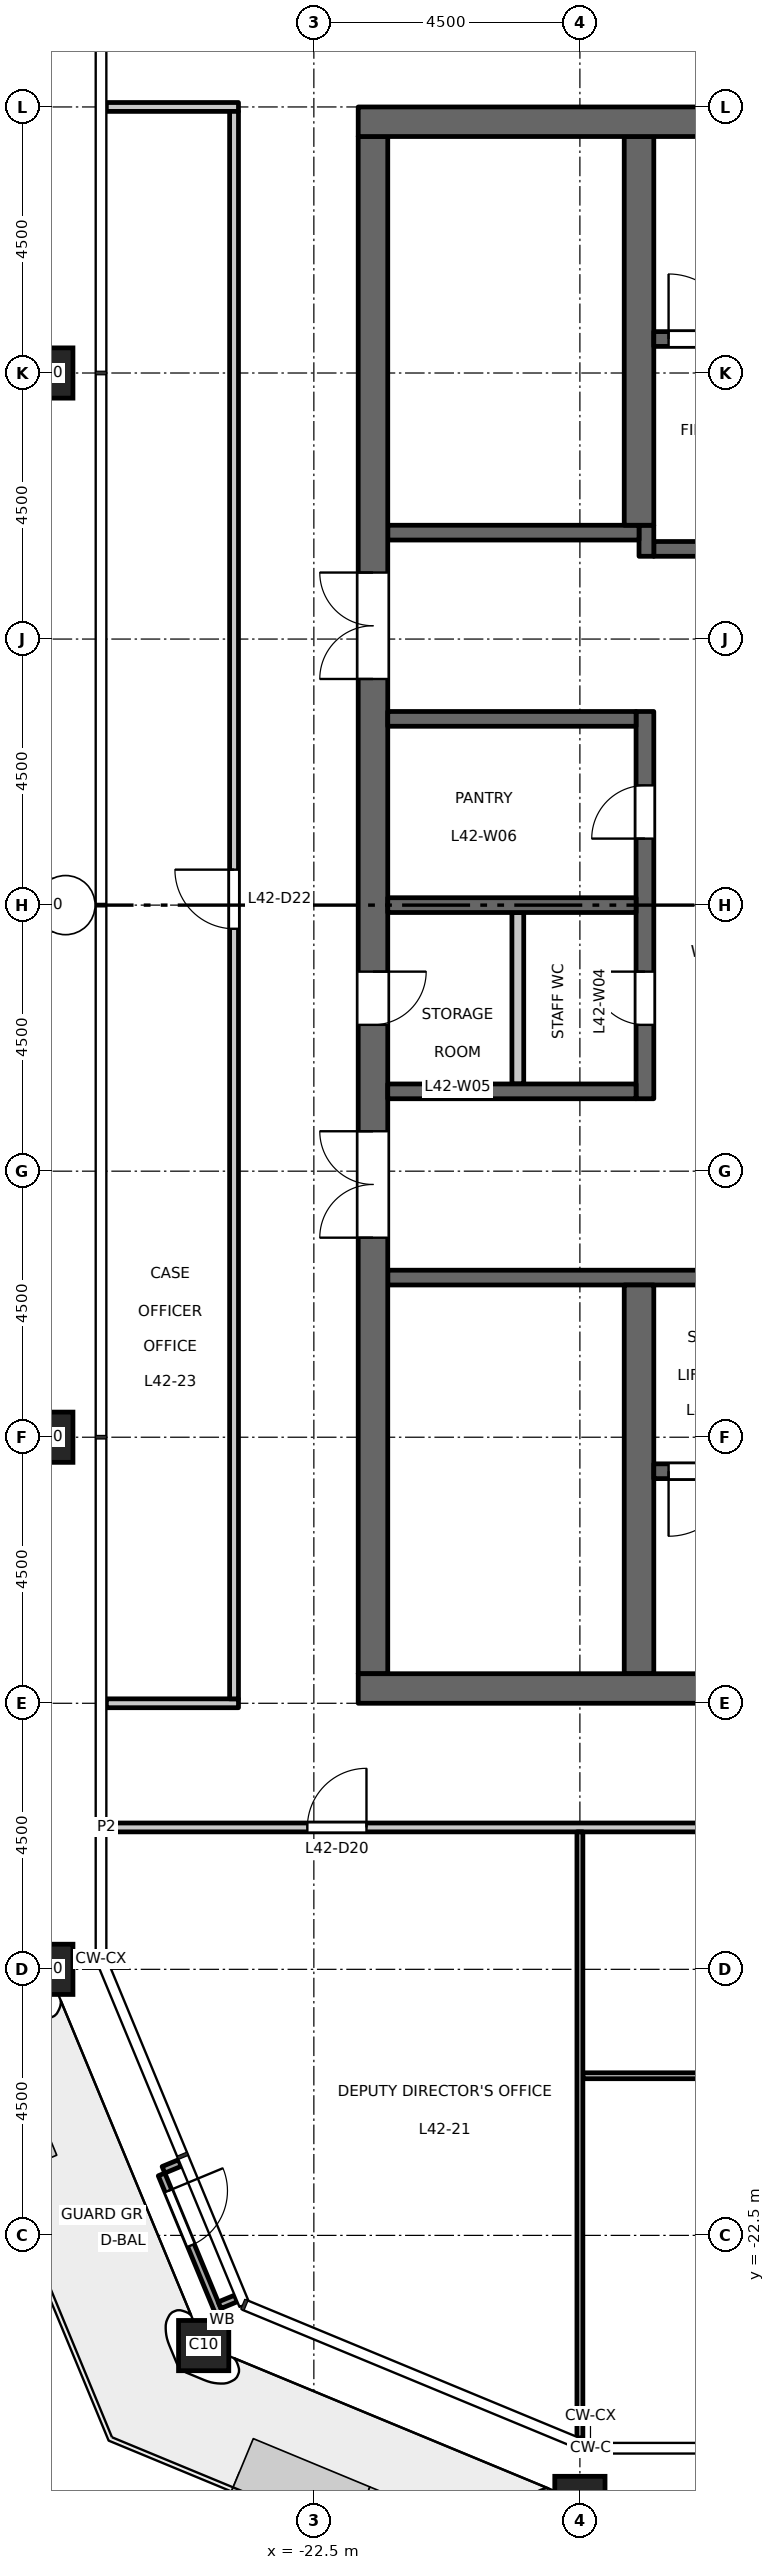
"""IFC4 building model, lengths in metres.
Left out: names, types, materials, properties, quantities, classifications, styles, units other than length and angle.
Written with IfcOpenShell. Run it as: python <this file> out.ifc"""

import sys

from ifc_helpers import new_model, si_unit, direction, frame, frame_2d, origin, origin_2d, place, context, subcontext, project, spatial, rectangle, hollow_rectangle, extrude, element, fill, save


model = new_model("IFC4")
c1 = context("Model", 3, precision=1e-05, world=origin(), true_north=direction((0.0, 1.0)))
c2 = subcontext(c1, "Body", "Model", "MODEL_VIEW")
j1 = project(units=[si_unit("LENGTHUNIT", "METRE"), si_unit("PLANEANGLEUNIT", "RADIAN")], contexts=[c1])
p1 = place(None, origin())
s1 = spatial("IfcSite", under=j1, at=p1, CompositionType="ELEMENT")
p2 = place(p1, origin())
s2 = spatial("IfcBuilding", under=s1, at=p2, CompositionType="ELEMENT")
p3 = place(p2, frame((0.0, 0.0, 197.2)))
s3 = spatial("IfcBuildingStorey", under=s2, at=p3, CompositionType="ELEMENT", Elevation=197.2)
for number, where, z_axis, x_axis in (
    (1, (-18.0, -27.0, 0.0), (0.0, 0.0, 1.0), (1.0, 0.0, 0.0)),
    (2, (-27.0, 9.0, 0.0), (0.0, 0.0, 1.0), (1.0, 0.0, 0.0)),
    (3, (-27.0, 0.0, 0.0), (0.0, 0.0, 1.0), (1.0, 0.0, 0.0)),
    (4, (-27.0, -9.0, 0.0), (0.0, 0.0, 1.0), (1.0, 0.0, 0.0)),
    (5, (-27.0, -18.0, 0.0), (0.0, 0.0, 1.0), (1.0, 0.0, 0.0)),
    (6, (-24.364, -24.364, 0.0), (0.0, 0.0, 1.0), (1.0, 0.0, 0.0)),
):
    element("IfcColumn", number, at=place(p3, frame(where, z_axis=z_axis, x_axis=x_axis)), inside=s3, PredefinedType="COLUMN", context=c2, shape_type="SweptSolid", body=[
        extrude(hollow_rectangle(XDim=0.85, YDim=0.85, WallThickness=0.05, at=origin_2d()), origin(), (0.0, 0.0, 1.0), 4.5),
    ])
p4 = place(p3, frame((-12.15, 6.025, 0.0), z_axis=(0.0, 0.0, 1.0), x_axis=(-1.0, 0.0, 0.0)))
e7 = element("IfcWall", 7, at=p4, inside=s3, PredefinedType="SHEAR", context=c2, shape_type="SweptSolid", body=[
    extrude(rectangle(XDim=4.6, YDim=0.25, at=frame_2d((2.3, 0.0))), origin(), (0.0, 0.0, 1.0), 4.35),
])
p5 = place(p4, frame((1.8, 0.0, 0.0)))
e8 = element("IfcOpeningElement", 8, at=p5, cuts=e7, PredefinedType="OPENING", context=c2, shape_type="SweptSolid", body=[
    extrude(rectangle(XDim=1.0, YDim=2.1, at=frame_2d((0.5, 1.05))), frame((0.0, 0.135, 0.0), z_axis=(0.0, -1.0, 0.0), x_axis=(1.0, 0.0, 0.0)), (0.0, 0.0, 1.0), 0.27),
])
p6 = place(p3, frame((-16.875, 5.9, 0.0), z_axis=(0.0, 0.0, 1.0), x_axis=(0.0, 1.0, 0.0)))
e9 = element("IfcWall", 9, at=p6, inside=s3, PredefinedType="SHEAR", context=c2, shape_type="SweptSolid", body=[
    extrude(rectangle(XDim=0.525, YDim=0.25, at=frame_2d((0.263, 0.0))), origin(), (0.0, 0.0, 1.0), 4.35),
])
p7 = place(p3, frame((-17.0, 6.3, 0.0), z_axis=(0.0, 0.0, 1.0), x_axis=(-1.0, 0.0, 0.0)))
e10 = element("IfcWall", 10, at=p7, inside=s3, PredefinedType="SHEAR", context=c2, shape_type="SweptSolid", body=[
    extrude(rectangle(XDim=4.25, YDim=0.25, at=frame_2d((2.125, 0.0))), origin(), (0.0, 0.0, 1.0), 4.35),
])
p8 = place(p3, frame((-12.15, -6.3, 0.0), z_axis=(0.0, 0.0, 1.0), x_axis=(-1.0, 0.0, 0.0)))
e11 = element("IfcWall", 11, at=p8, inside=s3, PredefinedType="SHEAR", context=c2, shape_type="SweptSolid", body=[
    extrude(rectangle(XDim=9.1, YDim=0.25, at=frame_2d((4.55, 0.0))), origin(), (0.0, 0.0, 1.0), 4.35),
])
p9 = place(p8, frame((1.8, 0.0, 0.0)))
e12 = element("IfcOpeningElement", 12, at=p9, cuts=e11, PredefinedType="OPENING", context=c2, shape_type="SweptSolid", body=[
    extrude(rectangle(XDim=1.0, YDim=2.1, at=frame_2d((0.5, 1.05))), frame((0.0, 0.135, 0.0), z_axis=(0.0, -1.0, 0.0), x_axis=(1.0, 0.0, 0.0)), (0.0, 0.0, 1.0), 0.27),
])
p10 = place(p3, frame((-21.5, -13.0, 0.0), z_axis=(0.0, 0.0, 1.0), x_axis=(0.0, 1.0, 0.0)))
e13 = element("IfcWall", 13, at=p10, inside=s3, PredefinedType="SHEAR", context=c2, shape_type="SweptSolid", body=[
    extrude(rectangle(XDim=26.0, YDim=0.5, at=frame_2d((13.0, 0.0))), origin(), (0.0, 0.0, 1.0), 4.35),
])
p11 = place(p10, frame((16.825, 0.0, 0.0)))
e14 = element("IfcOpeningElement", 14, at=p11, cuts=e13, PredefinedType="OPENING", context=c2, shape_type="SweptSolid", body=[
    extrude(rectangle(XDim=1.8, YDim=2.1, at=frame_2d((0.9, 1.05))), frame((0.0, 0.26, 0.0), z_axis=(0.0, -1.0, 0.0), x_axis=(1.0, 0.0, 0.0)), (0.0, 0.0, 1.0), 0.52),
])
p12 = place(p10, frame((7.375, 0.0, 0.0)))
e15 = element("IfcOpeningElement", 15, at=p12, cuts=e13, PredefinedType="OPENING", context=c2, shape_type="SweptSolid", body=[
    extrude(rectangle(XDim=1.8, YDim=2.1, at=frame_2d((0.9, 1.05))), frame((0.0, 0.26, 0.0), z_axis=(0.0, -1.0, 0.0), x_axis=(1.0, 0.0, 0.0)), (0.0, 0.0, 1.0), 0.52),
])
p13 = place(p10, frame((10.975, 0.0, 0.0)))
e16 = element("IfcOpeningElement", 16, at=p13, cuts=e13, PredefinedType="OPENING", context=c2, shape_type="SweptSolid", body=[
    extrude(rectangle(XDim=0.9, YDim=2.1, at=frame_2d((0.45, 1.05))), frame((0.0, 0.26, 0.0), z_axis=(0.0, -1.0, 0.0), x_axis=(1.0, 0.0, 0.0)), (0.0, 0.0, 1.0), 0.52),
])
p14 = place(p3, frame((-16.9, -3.275, 0.0), z_axis=(0.0, 0.0, 1.0), x_axis=(0.0, 1.0, 0.0)))
e17 = element("IfcWall", 17, at=p14, inside=s3, PredefinedType="SHEAR", context=c2, shape_type="SweptSolid", body=[
    extrude(rectangle(XDim=6.55, YDim=0.3, at=frame_2d((3.275, 0.0))), origin(), (0.0, 0.0, 1.0), 4.35),
])
p15 = place(p14, frame((1.25, 0.0, 0.0)))
e18 = element("IfcOpeningElement", 18, at=p15, cuts=e17, PredefinedType="OPENING", context=c2, shape_type="SweptSolid", body=[
    extrude(rectangle(XDim=0.9, YDim=2.1, at=frame_2d((0.45, 1.05))), frame((0.0, 0.16, 0.0), z_axis=(0.0, -1.0, 0.0), x_axis=(1.0, 0.0, 0.0)), (0.0, 0.0, 1.0), 0.32),
])
p16 = place(p14, frame((4.4, 0.0, 0.0)))
e19 = element("IfcOpeningElement", 19, at=p16, cuts=e17, PredefinedType="OPENING", context=c2, shape_type="SweptSolid", body=[
    extrude(rectangle(XDim=0.9, YDim=2.1, at=frame_2d((0.45, 1.05))), frame((0.0, 0.16, 0.0), z_axis=(0.0, -1.0, 0.0), x_axis=(1.0, 0.0, 0.0)), (0.0, 0.0, 1.0), 0.32),
])
for number, where, z_axis, x_axis in (
    (20, (-17.05, 0.0, 0.0), (0.0, 0.0, 1.0), (-1.0, 0.0, 0.0)),
    (21, (-17.05, 3.15, 0.0), (0.0, 0.0, 1.0), (-1.0, 0.0, 0.0)),
    (22, (-17.05, -3.15, 0.0), (0.0, 0.0, 1.0), (-1.0, 0.0, 0.0)),
):
    element("IfcWall", number, at=place(p3, frame(where, z_axis=z_axis, x_axis=x_axis)), inside=s3, PredefinedType="SHEAR", context=c2, shape_type="SweptSolid", body=[
        extrude(rectangle(XDim=4.2, YDim=0.25, at=frame_2d((2.1, 0.0))), origin(), (0.0, 0.0, 1.0), 4.35),
    ])
p17 = place(p3, frame((-19.05, -3.025, 0.0), z_axis=(0.0, 0.0, 1.0), x_axis=(0.0, 1.0, 0.0)))
e23 = element("IfcWall", 23, at=p17, inside=s3, PredefinedType="PARTITIONING", context=c2, shape_type="SweptSolid", body=[
    extrude(rectangle(XDim=2.9, YDim=0.2, at=frame_2d((1.45, 0.0))), origin(), (0.0, 0.0, 1.0), 4.35),
])
for number, where, z_axis, x_axis in (
    (24, (-17.0, 6.425, 0.0), (0.0, 0.0, 1.0), (0.0, 1.0, 0.0)),
    (25, (-17.0, -13.0, 0.0), (0.0, 0.0, 1.0), (0.0, 1.0, 0.0)),
):
    element("IfcWall", number, at=place(p3, frame(where, z_axis=z_axis, x_axis=x_axis)), inside=s3, PredefinedType="SHEAR", context=c2, shape_type="SweptSolid", body=[
        extrude(rectangle(XDim=6.575, YDim=0.5, at=frame_2d((3.288, 0.0))), origin(), (0.0, 0.0, 1.0), 4.35),
    ])
p18 = place(p3, frame((-8.75, 9.575, 0.0), z_axis=(0.0, 0.0, 1.0), x_axis=(-1.0, 0.0, 0.0)))
e26 = element("IfcWall", 26, at=p18, inside=s3, PredefinedType="SHEAR", context=c2, shape_type="SweptSolid", body=[
    extrude(rectangle(XDim=8.0, YDim=0.25, at=frame_2d((4.0, 0.0))), origin(), (0.0, 0.0, 1.0), 4.35),
])
p19 = place(p18, frame((6.65, 0.0, 0.0)))
e27 = element("IfcOpeningElement", 27, at=p19, cuts=e26, PredefinedType="OPENING", context=c2, shape_type="SweptSolid", body=[
    extrude(rectangle(XDim=1.1, YDim=2.1, at=frame_2d((0.55, 1.05))), frame((0.0, 0.135, 0.0), z_axis=(0.0, -1.0, 0.0), x_axis=(1.0, 0.0, 0.0)), (0.0, 0.0, 1.0), 0.27),
])
p20 = place(p3, frame((-8.75, -9.575, 0.0), z_axis=(0.0, 0.0, 1.0), x_axis=(-1.0, 0.0, 0.0)))
e28 = element("IfcWall", 28, at=p20, inside=s3, PredefinedType="SHEAR", context=c2, shape_type="SweptSolid", body=[
    extrude(rectangle(XDim=8.0, YDim=0.25, at=frame_2d((4.0, 0.0))), origin(), (0.0, 0.0, 1.0), 4.35),
])
p21 = place(p20, frame((6.65, 0.0, 0.0)))
e29 = element("IfcOpeningElement", 29, at=p21, cuts=e28, PredefinedType="OPENING", context=c2, shape_type="SweptSolid", body=[
    extrude(rectangle(XDim=1.1, YDim=2.1, at=frame_2d((0.55, 1.05))), frame((0.0, 0.135, 0.0), z_axis=(0.0, -1.0, 0.0), x_axis=(1.0, 0.0, 0.0)), (0.0, 0.0, 1.0), 0.27),
])
for number, where, z_axis, x_axis in (
    (30, (-8.25, 13.25, 0.0), (0.0, 0.0, 1.0), (-1.0, 0.0, 0.0)),
    (31, (-8.25, -13.25, 0.0), (0.0, 0.0, 1.0), (-1.0, 0.0, 0.0)),
):
    element("IfcWall", number, at=place(p3, frame(where, z_axis=z_axis, x_axis=x_axis)), inside=s3, PredefinedType="SHEAR", context=c2, shape_type="SweptSolid", body=[
        extrude(rectangle(XDim=13.5, YDim=0.5, at=frame_2d((6.75, 0.0))), origin(), (0.0, 0.0, 1.0), 4.35),
    ])
p22 = place(p3, frame((-24.766, -21.276, 0.0), z_axis=(0.0, 0.0, 1.0), x_axis=(-0.923917630863, -0.382591441855, 0.0)))
e32 = element("IfcWall", 32, at=p22, inside=s3, PredefinedType="STANDARD", context=c2, shape_type="SweptSolid", body=[
    extrude(rectangle(XDim=0.3, YDim=0.12, at=frame_2d((0.15, 0.0))), origin(), (0.0, 0.0, 1.0), 4.35),
])
p23 = place(p3, frame((-23.818, -23.566, 0.0), z_axis=(0.0, 0.0, 1.0), x_axis=(-0.923629715641, -0.383285987724, 0.0)))
e33 = element("IfcWall", 33, at=p23, inside=s3, PredefinedType="STANDARD", context=c2, shape_type="SweptSolid", body=[
    extrude(rectangle(XDim=0.3, YDim=0.12, at=frame_2d((0.15, 0.0))), origin(), (0.0, 0.0, 1.0), 4.35),
])
p24 = place(p3, frame((-25.076, -21.469, 0.0), z_axis=(0.0, 0.0, 1.0), x_axis=(0.382636771556, -0.923898858671, 0.0)))
e34 = element("IfcWall", 34, at=p24, inside=s3, PredefinedType="STANDARD", context=c2, shape_type="SweptSolid", body=[
    extrude(rectangle(XDim=2.673, YDim=0.12, at=frame_2d((1.337, 0.0))), origin(), (0.0, 0.0, 1.0), 4.35),
])
p25 = place(p24, frame((0.3, 0.0, 0.0)))
e35 = element("IfcOpeningElement", 35, at=p25, cuts=e34, PredefinedType="OPENING", context=c2, shape_type="SweptSolid", body=[
    extrude(rectangle(XDim=1.0, YDim=2.4, at=frame_2d((0.5, 1.2))), frame((0.0, 0.07, 0.0), z_axis=(0.0, -1.0, 0.0), x_axis=(1.0, 0.0, 0.0)), (0.0, 0.0, 1.0), 0.14),
])
p26 = place(p3, frame((-17.95, -19.8, 0.0), z_axis=(0.0, 0.0, 1.0), x_axis=(1.0, 0.0, 0.0)))
e36 = element("IfcWall", 36, at=p26, inside=s3, PredefinedType="PARTITIONING", context=c2, shape_type="SweptSolid", body=[
    extrude(rectangle(XDim=8.9, YDim=0.1, at=frame_2d((4.45, 0.0))), origin(), (0.0, 0.0, 1.0), 4.35),
])
p27 = place(p26, frame((3.85, 0.0, 0.0)))
e37 = element("IfcOpeningElement", 37, at=p27, cuts=e36, PredefinedType="OPENING", context=c2, shape_type="SweptSolid", body=[
    extrude(rectangle(XDim=1.0, YDim=2.1, at=frame_2d((0.5, 1.05))), frame((0.0, 0.06, 0.0), z_axis=(0.0, -1.0, 0.0), x_axis=(1.0, 0.0, 0.0)), (0.0, 0.0, 1.0), 0.12),
])
p28 = place(p3, frame((-26.01, -15.6, 0.0), z_axis=(0.0, 0.0, 1.0), x_axis=(1.0, 0.0, 0.0)))
e38 = element("IfcWall", 38, at=p28, inside=s3, PredefinedType="PARTITIONING", context=c2, shape_type="SweptSolid", body=[
    extrude(rectangle(XDim=52.02, YDim=0.15, at=frame_2d((26.01, 0.0))), origin(), (0.0, 0.0, 1.0), 4.35),
])
p29 = place(p28, frame((11.91, 0.0, 0.0)))
e39 = element("IfcOpeningElement", 39, at=p29, cuts=e38, PredefinedType="OPENING", context=c2, shape_type="SweptSolid", body=[
    extrude(rectangle(XDim=1.0, YDim=2.1, at=frame_2d((0.5, 1.05))), frame((0.0, 0.085, 0.0), z_axis=(0.0, -1.0, 0.0), x_axis=(1.0, 0.0, 0.0)), (0.0, 0.0, 1.0), 0.17),
])
p30 = place(p28, frame((20.91, 0.0, 0.0)))
e40 = element("IfcOpeningElement", 40, at=p30, cuts=e38, PredefinedType="OPENING", context=c2, shape_type="SweptSolid", body=[
    extrude(rectangle(XDim=1.0, YDim=2.1, at=frame_2d((0.5, 1.05))), frame((0.0, 0.085, 0.0), z_axis=(0.0, -1.0, 0.0), x_axis=(1.0, 0.0, 0.0)), (0.0, 0.0, 1.0), 0.17),
])
p31 = place(p28, frame((29.91, 0.0, 0.0)))
e41 = element("IfcOpeningElement", 41, at=p31, cuts=e38, PredefinedType="OPENING", context=c2, shape_type="SweptSolid", body=[
    extrude(rectangle(XDim=1.0, YDim=2.1, at=frame_2d((0.5, 1.05))), frame((0.0, 0.085, 0.0), z_axis=(0.0, -1.0, 0.0), x_axis=(1.0, 0.0, 0.0)), (0.0, 0.0, 1.0), 0.17),
])
p32 = place(p28, frame((38.91, 0.0, 0.0)))
e42 = element("IfcOpeningElement", 42, at=p32, cuts=e38, PredefinedType="OPENING", context=c2, shape_type="SweptSolid", body=[
    extrude(rectangle(XDim=1.0, YDim=2.1, at=frame_2d((0.5, 1.05))), frame((0.0, 0.085, 0.0), z_axis=(0.0, -1.0, 0.0), x_axis=(1.0, 0.0, 0.0)), (0.0, 0.0, 1.0), 0.17),
])
p33 = place(p28, frame((3.4, 0.0, 0.0)))
e43 = element("IfcOpeningElement", 43, at=p33, cuts=e38, PredefinedType="OPENING", context=c2, shape_type="SweptSolid", body=[
    extrude(rectangle(XDim=1.0, YDim=2.1, at=frame_2d((0.5, 1.05))), frame((0.0, 0.085, 0.0), z_axis=(0.0, -1.0, 0.0), x_axis=(1.0, 0.0, 0.0)), (0.0, 0.0, 1.0), 0.17),
])
p34 = place(p28, frame((47.41, 0.0, 0.0)))
e44 = element("IfcOpeningElement", 44, at=p34, cuts=e38, PredefinedType="OPENING", context=c2, shape_type="SweptSolid", body=[
    extrude(rectangle(XDim=1.0, YDim=2.1, at=frame_2d((0.5, 1.05))), frame((0.0, 0.085, 0.0), z_axis=(0.0, -1.0, 0.0), x_axis=(1.0, 0.0, 0.0)), (0.0, 0.0, 1.0), 0.17),
])
p35 = place(p3, frame((-26.01, -13.5, 0.0), z_axis=(0.0, 0.0, 1.0), x_axis=(1.0, 0.0, 0.0)))
e45 = element("IfcWall", 45, at=p35, inside=s3, PredefinedType="PARTITIONING", context=c2, shape_type="SweptSolid", body=[
    extrude(rectangle(XDim=2.235, YDim=0.15, at=frame_2d((1.118, 0.0))), origin(), (0.0, 0.0, 1.0), 3.95),
])
p36 = place(p3, frame((-26.01, 13.5, 0.0), z_axis=(0.0, 0.0, 1.0), x_axis=(1.0, 0.0, 0.0)))
e46 = element("IfcWall", 46, at=p36, inside=s3, PredefinedType="PARTITIONING", context=c2, shape_type="SweptSolid", body=[
    extrude(rectangle(XDim=2.235, YDim=0.15, at=frame_2d((1.118, 0.0))), origin(), (0.0, 0.0, 1.0), 4.35),
])
p37 = place(p3, frame((-23.85, -13.425, 0.0), z_axis=(0.0, 0.0, 1.0), x_axis=(0.0, 1.0, 0.0)))
e47 = element("IfcWall", 47, at=p37, inside=s3, PredefinedType="PARTITIONING", context=c2, shape_type="SweptSolid", body=[
    extrude(rectangle(XDim=26.85, YDim=0.15, at=frame_2d((13.425, 0.0))), origin(), (0.0, 0.0, 1.0), 4.35),
])
p38 = place(p37, frame((13.025, 0.0, 0.0)))
e48 = element("IfcOpeningElement", 48, at=p38, cuts=e47, PredefinedType="OPENING", context=c2, shape_type="SweptSolid", body=[
    extrude(rectangle(XDim=1.0, YDim=2.1, at=frame_2d((0.5, 1.05))), frame((0.0, 0.085, 0.0), z_axis=(0.0, -1.0, 0.0), x_axis=(1.0, 0.0, 0.0)), (0.0, 0.0, 1.0), 0.17),
])
p39 = place(p3, frame((-18.0, -25.928, 0.0), z_axis=(0.0, 0.0, 1.0), x_axis=(0.0, 1.0, 0.0)))
e49 = element("IfcWall", 49, at=p39, inside=s3, PredefinedType="PARTITIONING", context=c2, shape_type="SweptSolid", body=[
    extrude(rectangle(XDim=10.253, YDim=0.1, at=frame_2d((5.126, 0.0))), origin(), (0.0, 0.0, 1.0), 3.65),
])
p40 = place(p19, origin())
e50 = element("IfcDoor", 50, at=p40, inside=s3, OperationType="SINGLE_SWING_RIGHT", PredefinedType="DOOR", context=c2, shape_type="SweptSolid", body=[
    extrude(rectangle(XDim=1.1, YDim=2.1, at=frame_2d((0.55, 1.05))), frame((0.0, 0.025, 0.0), z_axis=(0.0, -1.0, 0.0), x_axis=(1.0, 0.0, 0.0)), (0.0, 0.0, 1.0), 0.05),
])
fill(e27, e50)
p41 = place(p21, origin())
e51 = element("IfcDoor", 51, at=p41, inside=s3, OperationType="SINGLE_SWING_LEFT", PredefinedType="DOOR", context=c2, shape_type="SweptSolid", body=[
    extrude(rectangle(XDim=1.1, YDim=2.1, at=frame_2d((0.55, 1.05))), frame((0.0, 0.025, 0.0), z_axis=(0.0, -1.0, 0.0), x_axis=(1.0, 0.0, 0.0)), (0.0, 0.0, 1.0), 0.05),
])
fill(e29, e51)
p42 = place(p11, origin())
e52 = element("IfcDoor", 52, at=p42, inside=s3, OperationType="DOUBLE_DOOR_DOUBLE_SWING", PredefinedType="DOOR", context=c2, shape_type="SweptSolid", body=[
    extrude(rectangle(XDim=1.8, YDim=2.1, at=frame_2d((0.9, 1.05))), frame((0.0, 0.025, 0.0), z_axis=(0.0, -1.0, 0.0), x_axis=(1.0, 0.0, 0.0)), (0.0, 0.0, 1.0), 0.05),
])
fill(e14, e52)
p43 = place(p12, origin())
e53 = element("IfcDoor", 53, at=p43, inside=s3, OperationType="DOUBLE_DOOR_DOUBLE_SWING", PredefinedType="DOOR", context=c2, shape_type="SweptSolid", body=[
    extrude(rectangle(XDim=1.8, YDim=2.1, at=frame_2d((0.9, 1.05))), frame((0.0, 0.025, 0.0), z_axis=(0.0, -1.0, 0.0), x_axis=(1.0, 0.0, 0.0)), (0.0, 0.0, 1.0), 0.05),
])
fill(e15, e53)
p44 = place(p15, origin())
e54 = element("IfcDoor", 54, at=p44, inside=s3, OperationType="SINGLE_SWING_LEFT", PredefinedType="DOOR", context=c2, shape_type="SweptSolid", body=[
    extrude(rectangle(XDim=0.9, YDim=2.1, at=frame_2d((0.45, 1.05))), frame((0.0, 0.025, 0.0), z_axis=(0.0, -1.0, 0.0), x_axis=(1.0, 0.0, 0.0)), (0.0, 0.0, 1.0), 0.05),
])
fill(e18, e54)
p45 = place(p13, origin())
e55 = element("IfcDoor", 55, at=p45, inside=s3, OperationType="SINGLE_SWING_RIGHT", PredefinedType="DOOR", context=c2, shape_type="SweptSolid", body=[
    extrude(rectangle(XDim=0.9, YDim=2.1, at=frame_2d((0.45, 1.05))), frame((0.0, 0.025, 0.0), z_axis=(0.0, -1.0, 0.0), x_axis=(1.0, 0.0, 0.0)), (0.0, 0.0, 1.0), 0.05),
])
fill(e16, e55)
p46 = place(p16, origin())
e56 = element("IfcDoor", 56, at=p46, inside=s3, OperationType="SINGLE_SWING_RIGHT", PredefinedType="DOOR", context=c2, shape_type="SweptSolid", body=[
    extrude(rectangle(XDim=0.9, YDim=2.1, at=frame_2d((0.45, 1.05))), frame((0.0, 0.025, 0.0), z_axis=(0.0, -1.0, 0.0), x_axis=(1.0, 0.0, 0.0)), (0.0, 0.0, 1.0), 0.05),
])
fill(e19, e56)
p47 = place(p25, origin())
e57 = element("IfcDoor", 57, at=p47, inside=s3, OperationType="SINGLE_SWING_LEFT", PredefinedType="DOOR", context=c2, shape_type="SweptSolid", body=[
    extrude(rectangle(XDim=1.0, YDim=2.4, at=frame_2d((0.5, 1.2))), frame((0.0, 0.025, 0.0), z_axis=(0.0, -1.0, 0.0), x_axis=(1.0, 0.0, 0.0)), (0.0, 0.0, 1.0), 0.05),
])
fill(e35, e57)
p48 = place(p33, origin())
e58 = element("IfcDoor", 58, at=p48, inside=s3, OperationType="SINGLE_SWING_RIGHT", PredefinedType="DOOR", context=c2, shape_type="SweptSolid", body=[
    extrude(rectangle(XDim=1.0, YDim=2.1, at=frame_2d((0.5, 1.05))), frame((0.0, 0.025, 0.0), z_axis=(0.0, -1.0, 0.0), x_axis=(1.0, 0.0, 0.0)), (0.0, 0.0, 1.0), 0.05),
])
fill(e43, e58)
p49 = place(p38, origin())
e59 = element("IfcDoor", 59, at=p49, inside=s3, OperationType="SINGLE_SWING_RIGHT", PredefinedType="DOOR", context=c2, shape_type="SweptSolid", body=[
    extrude(rectangle(XDim=1.0, YDim=2.1, at=frame_2d((0.5, 1.05))), frame((0.0, 0.025, 0.0), z_axis=(0.0, -1.0, 0.0), x_axis=(1.0, 0.0, 0.0)), (0.0, 0.0, 1.0), 0.05),
])
fill(e48, e59)
save(model, sys.argv[1])
